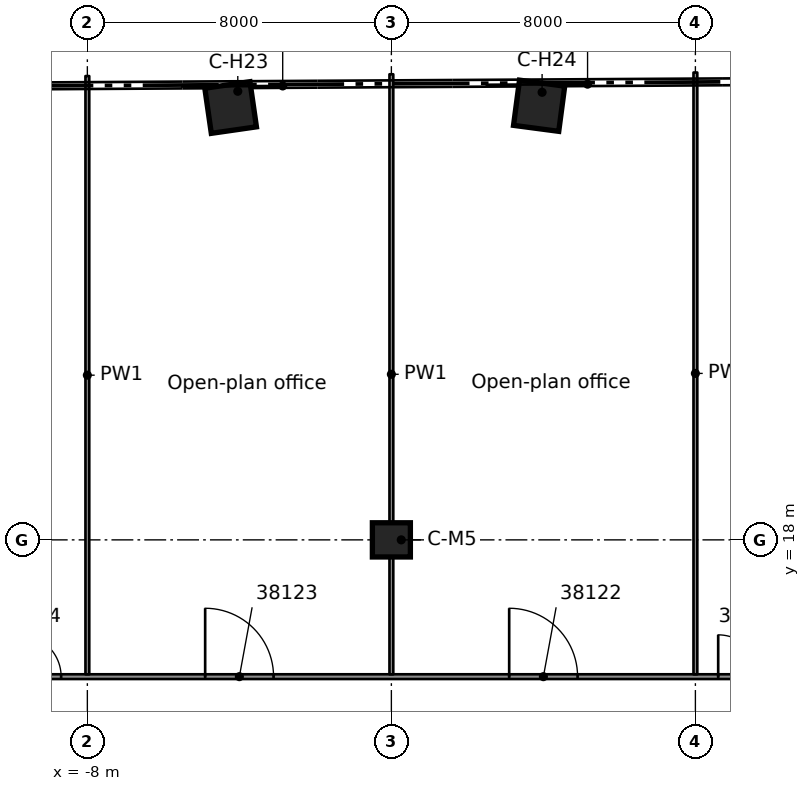
"""IFC4 building model, lengths in metres.
Left out: names, types, materials, properties, quantities, classifications, styles, units other than length and angle.
Written with IfcOpenShell. Run it as: python <this file> out.ifc"""

import sys

from ifc_helpers import new_model, si_unit, direction, frame, frame_2d, origin, origin_2d, place, context, subcontext, project, spatial, rectangle, extrude, element, fill, save


model = new_model("IFC4")
c1 = context("Model", 3, precision=1e-05, world=origin(), true_north=direction((0.0, 1.0)))
c2 = subcontext(c1, "Body", "Model", "MODEL_VIEW")
j1 = project(units=[si_unit("LENGTHUNIT", "METRE"), si_unit("PLANEANGLEUNIT", "RADIAN")], contexts=[c1])
p1 = place(None, origin())
s1 = spatial("IfcSite", under=j1, at=p1, CompositionType="ELEMENT")
p2 = place(p1, origin())
s2 = spatial("IfcBuilding", under=s1, at=p2, CompositionType="ELEMENT")
p3 = place(p2, frame((0.0, 0.0, 188.6)))
s3 = spatial("IfcBuildingStorey", under=s2, at=p3, CompositionType="ELEMENT", Elevation=188.6)
for number, where, z_axis, x_axis in (
    (1, (-4.23, 29.376, 0.0), (0.0, 0.0, 1.0), (-0.143, 0.99, 0.0)),
    (2, (3.888, 29.423, 0.0), (0.0, 0.0, 1.0), (0.131, 0.991, 0.0)),
):
    element("IfcColumn", number, at=place(p3, frame(where, z_axis=z_axis, x_axis=x_axis)), inside=s3, PredefinedType="COLUMN", context=c2, shape_type="SweptSolid", body=[
        extrude(rectangle(XDim=1.2, YDim=1.2, at=origin_2d()), origin(), (0.0, 0.0, 1.0), 3.5),
    ])
p4 = place(p3, frame((0.0, 18.0, 0.0), z_axis=(0.0, 0.0, 1.0), x_axis=(1.0, 0.0, 0.0)))
e3 = element("IfcColumn", 3, at=p4, inside=s3, PredefinedType="COLUMN", context=c2, shape_type="SweptSolid", body=[
    extrude(rectangle(XDim=1.0, YDim=0.9, at=origin_2d()), origin(), (0.0, 0.0, 1.0), 3.5),
])
p5 = place(p3, frame((-10.39, 14.401, 0.0), z_axis=(0.0, 0.0, 1.0), x_axis=(1.0, 0.0, 0.0)))
e4 = element("IfcWall", 4, at=p5, inside=s3, PredefinedType="PARTITIONING", context=c2, shape_type="SweptSolid", body=[
    extrude(rectangle(XDim=20.781, YDim=0.125, at=frame_2d((10.391, 0.0))), origin(), (0.0, 0.0, 1.0), 3.06),
])
p6 = place(p5, frame((18.99, 0.0, 0.0)))
e5 = element("IfcOpeningElement", 5, at=p6, cuts=e4, PredefinedType="OPENING", context=c2, shape_type="SweptSolid", body=[
    extrude(rectangle(XDim=1.1, YDim=2.1, at=frame_2d((0.55, 1.05))), frame((0.0, 0.073, 0.0), z_axis=(0.0, -1.0, 0.0), x_axis=(1.0, 0.0, 0.0)), (0.0, 0.0, 1.0), 0.145),
])
p7 = place(p5, frame((13.49, 0.0, 0.0)))
e6 = element("IfcOpeningElement", 6, at=p7, cuts=e4, PredefinedType="OPENING", context=c2, shape_type="SweptSolid", body=[
    extrude(rectangle(XDim=1.8, YDim=2.1, at=frame_2d((0.9, 1.05))), frame((0.0, 0.073, 0.0), z_axis=(0.0, -1.0, 0.0), x_axis=(1.0, 0.0, 0.0)), (0.0, 0.0, 1.0), 0.145),
])
p8 = place(p5, frame((5.49, 0.0, 0.0)))
e7 = element("IfcOpeningElement", 7, at=p8, cuts=e4, PredefinedType="OPENING", context=c2, shape_type="SweptSolid", body=[
    extrude(rectangle(XDim=1.8, YDim=2.1, at=frame_2d((0.9, 1.05))), frame((0.0, 0.073, 0.0), z_axis=(0.0, -1.0, 0.0), x_axis=(1.0, 0.0, 0.0)), (0.0, 0.0, 1.0), 0.145),
])
p9 = place(p5, frame((0.6, 0.0, 0.0)))
e8 = element("IfcOpeningElement", 8, at=p9, cuts=e4, PredefinedType="OPENING", context=c2, shape_type="SweptSolid", body=[
    extrude(rectangle(XDim=1.1, YDim=2.1, at=frame_2d((0.55, 1.05))), frame((0.0, 0.073, 0.0), z_axis=(0.0, -1.0, 0.0), x_axis=(1.0, 0.0, 0.0)), (0.0, 0.0, 1.0), 0.145),
])
p10 = place(p3, frame((8.0, 14.463, 0.0), z_axis=(0.0, 0.0, 1.0), x_axis=(0.0, 1.0, 0.0)))
e9 = element("IfcWall", 9, at=p10, inside=s3, PredefinedType="PARTITIONING", context=c2, shape_type="SweptSolid", body=[
    extrude(rectangle(XDim=15.834, YDim=0.1, at=frame_2d((7.917, 0.0))), origin(), (0.0, 0.0, 1.0), 3.06),
])
p11 = place(p3, frame((0.0, 14.463, 0.0), z_axis=(0.0, 0.0, 1.0), x_axis=(0.0, 1.0, 0.0)))
e10 = element("IfcWall", 10, at=p11, inside=s3, PredefinedType="PARTITIONING", context=c2, shape_type="SweptSolid", body=[
    extrude(rectangle(XDim=15.788, YDim=0.1, at=frame_2d((7.894, 0.0))), origin(), (0.0, 0.0, 1.0), 3.06),
])
p12 = place(p3, frame((-8.0, 14.463, 0.0), z_axis=(0.0, 0.0, 1.0), x_axis=(0.0, 1.0, 0.0)))
e11 = element("IfcWall", 11, at=p12, inside=s3, PredefinedType="PARTITIONING", context=c2, shape_type="SweptSolid", body=[
    extrude(rectangle(XDim=15.741, YDim=0.1, at=frame_2d((7.871, 0.0))), origin(), (0.0, 0.0, 1.0), 3.06),
])
p13 = place(p6, origin())
e12 = element("IfcDoor", 12, at=p13, inside=s3, OperationType="SINGLE_SWING_RIGHT", PredefinedType="DOOR", context=c2, shape_type="SweptSolid", body=[
    extrude(rectangle(XDim=1.1, YDim=2.1, at=frame_2d((0.55, 1.05))), frame((0.0, 0.025, 0.0), z_axis=(0.0, -1.0, 0.0), x_axis=(1.0, 0.0, 0.0)), (0.0, 0.0, 1.0), 0.05),
])
fill(e5, e12)
p14 = place(p7, origin())
e13 = element("IfcDoor", 13, at=p14, inside=s3, OperationType="DOUBLE_DOOR_SINGLE_SWING", PredefinedType="DOOR", context=c2, shape_type="SweptSolid", body=[
    extrude(rectangle(XDim=1.8, YDim=2.1, at=frame_2d((0.9, 1.05))), frame((0.0, 0.025, 0.0), z_axis=(0.0, -1.0, 0.0), x_axis=(1.0, 0.0, 0.0)), (0.0, 0.0, 1.0), 0.05),
])
fill(e6, e13)
p15 = place(p8, origin())
e14 = element("IfcDoor", 14, at=p15, inside=s3, OperationType="DOUBLE_DOOR_SINGLE_SWING", PredefinedType="DOOR", context=c2, shape_type="SweptSolid", body=[
    extrude(rectangle(XDim=1.8, YDim=2.1, at=frame_2d((0.9, 1.05))), frame((0.0, 0.025, 0.0), z_axis=(0.0, -1.0, 0.0), x_axis=(1.0, 0.0, 0.0)), (0.0, 0.0, 1.0), 0.05),
])
fill(e7, e14)
p16 = place(p9, origin())
e15 = element("IfcDoor", 15, at=p16, inside=s3, OperationType="SINGLE_SWING_LEFT", PredefinedType="DOOR", context=c2, shape_type="SweptSolid", body=[
    extrude(rectangle(XDim=1.1, YDim=2.1, at=frame_2d((0.55, 1.05))), frame((0.0, 0.025, 0.0), z_axis=(0.0, -1.0, 0.0), x_axis=(1.0, 0.0, 0.0)), (0.0, 0.0, 1.0), 0.05),
])
fill(e8, e15)
save(model, sys.argv[1])
